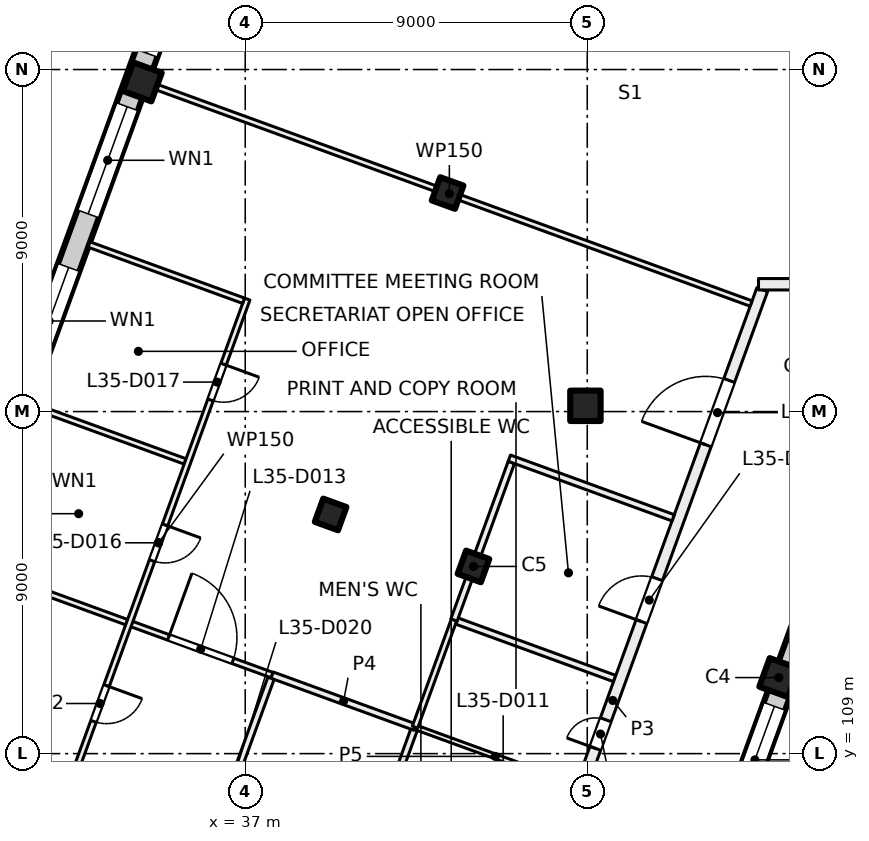
"""IFC4 building model, lengths in metres.
Left out: names, types, materials, properties, quantities, classifications, styles, units other than length and angle.
Written with IfcOpenShell. Run it as: python <this file> out.ifc"""

import sys

from ifc_helpers import new_model, si_unit, direction, frame, frame_2d, origin, origin_2d, place, context, subcontext, project, spatial, rectangle, extrude, element, fill, save


model = new_model("IFC4")
c1 = context("Model", 3, precision=1e-05, world=origin(), true_north=direction((0.0, 1.0)))
c2 = subcontext(c1, "Body", "Model", "MODEL_VIEW")
j1 = project(units=[si_unit("LENGTHUNIT", "METRE"), si_unit("PLANEANGLEUNIT", "RADIAN")], contexts=[c1])
p1 = place(None, origin())
s1 = spatial("IfcSite", under=j1, at=p1, CompositionType="ELEMENT")
p2 = place(p1, origin())
s2 = spatial("IfcBuilding", under=s1, at=p2, CompositionType="ELEMENT")
p3 = place(p2, frame((0.0, 0.0, 150.5)))
s3 = spatial("IfcBuildingStorey", under=s2, at=p3, CompositionType="ELEMENT", Elevation=150.5)
p4 = place(p3, frame((45.952, 118.152, 0.0), z_axis=(0.0, 0.0, 1.0), x_axis=(1.0, 0.0, 0.0)))
e1 = element("IfcColumn", 1, at=p4, inside=s3, PredefinedType="COLUMN", context=c2, shape_type="SweptSolid", body=[
    extrude(rectangle(XDim=0.8, YDim=0.8, at=origin_2d()), origin(), (0.0, 0.0, 1.0), 4.0),
])
for number, where, z_axis, x_axis in (
    (2, (43.006, 113.925, 0.0), (0.0, 0.0, 1.0), (-0.342, -0.94, 0.0)),
    (3, (42.325, 123.751, 0.0), (0.0, 0.0, 1.0), (-0.342, -0.94, 0.0)),
    (4, (39.247, 115.293, 0.0), (0.0, 0.0, 1.0), (-0.342, -0.94, 0.0)),
):
    element("IfcColumn", number, at=place(p3, frame(where, z_axis=z_axis, x_axis=x_axis)), inside=s3, PredefinedType="COLUMN", context=c2, shape_type="SweptSolid", body=[
        extrude(rectangle(XDim=0.65, YDim=0.65, at=origin_2d()), origin(), (0.0, 0.0, 1.0), 4.0),
    ])
for number, where, z_axis, x_axis in (
    (5, (51.04, 111.001, 0.0), (0.0, 0.0, 1.0), (-0.342, -0.94, 0.0)),
    (6, (34.291, 126.675, 0.0), (0.0, 0.0, 1.0), (-0.342, -0.94, 0.0)),
):
    element("IfcColumn", number, at=place(p3, frame(where, z_axis=z_axis, x_axis=x_axis)), inside=s3, PredefinedType="COLUMN", context=c2, shape_type="SweptSolid", body=[
        extrude(rectangle(XDim=0.8, YDim=0.8, at=origin_2d()), origin(), (0.0, 0.0, 1.0), 4.0),
    ])
p5 = place(p3, frame((52.212, 113.783, 0.0), z_axis=(0.0, 0.0, 1.0), x_axis=(-0.34202521188, -0.939690775968, 0.0)))
e7 = element("IfcWall", 7, at=p5, inside=s3, PredefinedType="SOLIDWALL", context=c2, shape_type="SweptSolid", body=[
    extrude(rectangle(XDim=21.745, YDim=0.6, at=frame_2d((10.873, 0.0))), origin(), (0.0, 0.0, 1.0), 3.625),
])
p6 = place(p5, frame((3.765, 0.0, 0.9)))
e8 = element("IfcOpeningElement", 8, at=p6, cuts=e7, PredefinedType="OPENING", context=c2, shape_type="SweptSolid", body=[
    extrude(rectangle(XDim=3.0, YDim=2.4, at=frame_2d((1.5, 1.2))), frame((0.0, 0.31, 0.0), z_axis=(0.0, -1.0, 0.0), x_axis=(1.0, 0.0, 0.0)), (0.0, 0.0, 1.0), 0.62),
])
p7 = place(p5, frame((8.265, 0.0, 0.9)))
e9 = element("IfcOpeningElement", 9, at=p7, cuts=e7, PredefinedType="OPENING", context=c2, shape_type="SweptSolid", body=[
    extrude(rectangle(XDim=3.0, YDim=2.4, at=frame_2d((1.5, 1.2))), frame((0.0, 0.31, 0.0), z_axis=(0.0, -1.0, 0.0), x_axis=(1.0, 0.0, 0.0)), (0.0, 0.0, 1.0), 0.62),
])
p8 = place(p5, frame((12.765, 0.0, 0.9)))
e10 = element("IfcOpeningElement", 10, at=p8, cuts=e7, PredefinedType="OPENING", context=c2, shape_type="SweptSolid", body=[
    extrude(rectangle(XDim=3.0, YDim=2.4, at=frame_2d((1.5, 1.2))), frame((0.0, 0.31, 0.0), z_axis=(0.0, -1.0, 0.0), x_axis=(1.0, 0.0, 0.0)), (0.0, 0.0, 1.0), 0.62),
])
p9 = place(p5, frame((17.265, 0.0, 0.9)))
e11 = element("IfcOpeningElement", 11, at=p9, cuts=e7, PredefinedType="OPENING", context=c2, shape_type="SweptSolid", body=[
    extrude(rectangle(XDim=3.0, YDim=2.4, at=frame_2d((1.5, 1.2))), frame((0.0, 0.31, 0.0), z_axis=(0.0, -1.0, 0.0), x_axis=(1.0, 0.0, 0.0)), (0.0, 0.0, 1.0), 0.62),
])
p10 = place(p3, frame((24.666, 100.669, 0.0), z_axis=(0.0, 0.0, 1.0), x_axis=(0.34201964167, 0.939692803373, 0.0)))
e12 = element("IfcWall", 12, at=p10, inside=s3, PredefinedType="SOLIDWALL", context=c2, shape_type="SweptSolid", body=[
    extrude(rectangle(XDim=32.884, YDim=0.6, at=frame_2d((16.442, 0.0))), origin(), (0.0, 0.0, 1.0), 3.625),
])
p11 = place(p10, frame((1.48, 0.0, 0.9)))
e13 = element("IfcOpeningElement", 13, at=p11, cuts=e12, PredefinedType="OPENING", context=c2, shape_type="SweptSolid", body=[
    extrude(rectangle(XDim=3.0, YDim=2.4, at=frame_2d((1.5, 1.2))), frame((0.0, 0.31, 0.0), z_axis=(0.0, -1.0, 0.0), x_axis=(1.0, 0.0, 0.0)), (0.0, 0.0, 1.0), 0.62),
])
p12 = place(p10, frame((5.98, 0.0, 0.9)))
e14 = element("IfcOpeningElement", 14, at=p12, cuts=e12, PredefinedType="OPENING", context=c2, shape_type="SweptSolid", body=[
    extrude(rectangle(XDim=3.0, YDim=2.4, at=frame_2d((1.5, 1.2))), frame((0.0, 0.31, 0.0), z_axis=(0.0, -1.0, 0.0), x_axis=(1.0, 0.0, 0.0)), (0.0, 0.0, 1.0), 0.62),
])
p13 = place(p10, frame((10.48, 0.0, 0.9)))
e15 = element("IfcOpeningElement", 15, at=p13, cuts=e12, PredefinedType="OPENING", context=c2, shape_type="SweptSolid", body=[
    extrude(rectangle(XDim=3.0, YDim=2.4, at=frame_2d((1.5, 1.2))), frame((0.0, 0.31, 0.0), z_axis=(0.0, -1.0, 0.0), x_axis=(1.0, 0.0, 0.0)), (0.0, 0.0, 1.0), 0.62),
])
p14 = place(p10, frame((14.98, 0.0, 0.9)))
e16 = element("IfcOpeningElement", 16, at=p14, cuts=e12, PredefinedType="OPENING", context=c2, shape_type="SweptSolid", body=[
    extrude(rectangle(XDim=3.0, YDim=2.4, at=frame_2d((1.5, 1.2))), frame((0.0, 0.31, 0.0), z_axis=(0.0, -1.0, 0.0), x_axis=(1.0, 0.0, 0.0)), (0.0, 0.0, 1.0), 0.62),
])
p15 = place(p10, frame((19.48, 0.0, 0.9)))
e17 = element("IfcOpeningElement", 17, at=p15, cuts=e12, PredefinedType="OPENING", context=c2, shape_type="SweptSolid", body=[
    extrude(rectangle(XDim=3.0, YDim=2.4, at=frame_2d((1.5, 1.2))), frame((0.0, 0.31, 0.0), z_axis=(0.0, -1.0, 0.0), x_axis=(1.0, 0.0, 0.0)), (0.0, 0.0, 1.0), 0.62),
])
p16 = place(p10, frame((23.98, 0.0, 0.9)))
e18 = element("IfcOpeningElement", 18, at=p16, cuts=e12, PredefinedType="OPENING", context=c2, shape_type="SweptSolid", body=[
    extrude(rectangle(XDim=3.0, YDim=2.4, at=frame_2d((1.5, 1.2))), frame((0.0, 0.31, 0.0), z_axis=(0.0, -1.0, 0.0), x_axis=(1.0, 0.0, 0.0)), (0.0, 0.0, 1.0), 0.62),
])
p17 = place(p10, frame((28.48, 0.0, 0.9)))
e19 = element("IfcOpeningElement", 19, at=p17, cuts=e12, PredefinedType="OPENING", context=c2, shape_type="SweptSolid", body=[
    extrude(rectangle(XDim=3.0, YDim=2.4, at=frame_2d((1.5, 1.2))), frame((0.0, 0.31, 0.0), z_axis=(0.0, -1.0, 0.0), x_axis=(1.0, 0.0, 0.0)), (0.0, 0.0, 1.0), 0.62),
])
p18 = place(p3, frame((29.814, 113.938, 0.0), z_axis=(0.0, 0.0, 1.0), x_axis=(0.939698351515, -0.342004397867, 0.0)))
e20 = element("IfcWall", 20, at=p18, inside=s3, PredefinedType="PARTITIONING", context=c2, shape_type="SweptSolid", body=[
    extrude(rectangle(XDim=8.401, YDim=0.15, at=frame_2d((4.2, 0.0))), origin(), (0.0, 0.0, 1.0), 3.625),
])
p19 = place(p18, frame((5.5, 0.0, 0.0)))
e21 = element("IfcOpeningElement", 21, at=p19, cuts=e20, PredefinedType="OPENING", context=c2, shape_type="SweptSolid", body=[
    extrude(rectangle(XDim=1.8, YDim=2.1, at=frame_2d((0.9, 1.05))), frame((0.0, 0.085, 0.0), z_axis=(0.0, -1.0, 0.0), x_axis=(1.0, 0.0, 0.0)), (0.0, 0.0, 1.0), 0.17),
])
p20 = place(p3, frame((31.353, 118.166, 0.0), z_axis=(0.0, 0.0, 1.0), x_axis=(0.939803311208, -0.341715870634, 0.0)))
e22 = element("IfcWall", 22, at=p20, inside=s3, PredefinedType="PARTITIONING", context=c2, shape_type="SweptSolid", body=[
    extrude(rectangle(XDim=4.325, YDim=0.15, at=frame_2d((2.163, 0.0))), origin(), (0.0, 0.0, 1.0), 3.625),
])
p21 = place(p3, frame((32.34, 108.23, 0.0), z_axis=(0.0, 0.0, 1.0), x_axis=(-0.939737385516, 0.341897128188, 0.0)))
e23 = element("IfcWall", 23, at=p21, inside=s3, PredefinedType="PARTITIONING", context=c2, shape_type="SweptSolid", body=[
    extrude(rectangle(XDim=4.326, YDim=0.15, at=frame_2d((2.163, 0.0))), origin(), (0.0, 0.0, 1.0), 3.625),
])
p22 = place(p3, frame((37.053, 120.96, 0.0), z_axis=(0.0, 0.0, 1.0), x_axis=(-0.342064742067, -0.939676386973, 0.0)))
e24 = element("IfcWall", 24, at=p22, inside=s3, PredefinedType="PARTITIONING", context=c2, shape_type="SweptSolid", body=[
    extrude(rectangle(XDim=13.649, YDim=0.15, at=frame_2d((6.825, 0.0))), origin(), (0.0, 0.0, 1.0), 3.625),
])
p23 = place(p22, frame((10.824, 0.0, 0.0)))
e25 = element("IfcOpeningElement", 25, at=p23, cuts=e24, PredefinedType="OPENING", context=c2, shape_type="SweptSolid", body=[
    extrude(rectangle(XDim=1.0, YDim=2.1, at=frame_2d((0.5, 1.05))), frame((0.0, 0.085, 0.0), z_axis=(0.0, -1.0, 0.0), x_axis=(1.0, 0.0, 0.0)), (0.0, 0.0, 1.0), 0.17),
])
p24 = place(p22, frame((6.324, 0.0, 0.0)))
e26 = element("IfcOpeningElement", 26, at=p24, cuts=e24, PredefinedType="OPENING", context=c2, shape_type="SweptSolid", body=[
    extrude(rectangle(XDim=1.0, YDim=2.1, at=frame_2d((0.5, 1.05))), frame((0.0, 0.085, 0.0), z_axis=(0.0, -1.0, 0.0), x_axis=(1.0, 0.0, 0.0)), (0.0, 0.0, 1.0), 0.17),
])
p25 = place(p22, frame((1.824, 0.0, 0.0)))
e27 = element("IfcOpeningElement", 27, at=p25, cuts=e24, PredefinedType="OPENING", context=c2, shape_type="SweptSolid", body=[
    extrude(rectangle(XDim=1.0, YDim=2.1, at=frame_2d((0.5, 1.05))), frame((0.0, 0.085, 0.0), z_axis=(0.0, -1.0, 0.0), x_axis=(1.0, 0.0, 0.0)), (0.0, 0.0, 1.0), 0.17),
])
p26 = place(p3, frame((32.892, 122.395, 0.0), z_axis=(0.0, 0.0, 1.0), x_axis=(0.93973078783, -0.341915262023, 0.0)))
e28 = element("IfcWall", 28, at=p26, inside=s3, PredefinedType="PARTITIONING", context=c2, shape_type="SweptSolid", body=[
    extrude(rectangle(XDim=4.326, YDim=0.15, at=frame_2d((2.163, 0.0))), origin(), (0.0, 0.0, 1.0), 3.625),
])
p27 = place(p3, frame((34.66, 102.689, 0.0), z_axis=(0.0, 0.0, 1.0), x_axis=(0.341951828534, 0.939717482524, 0.0)))
e29 = element("IfcWall", 29, at=p27, inside=s3, PredefinedType="PARTITIONING", context=c2, shape_type="SweptSolid", body=[
    extrude(rectangle(XDim=8.826, YDim=0.175, at=frame_2d((4.413, 0.0))), origin(), (0.0, 0.0, 1.0), 3.625),
])
p28 = place(p27, frame((4.813, 0.0, 0.0)))
e30 = element("IfcOpeningElement", 30, at=p28, cuts=e29, PredefinedType="OPENING", context=c2, shape_type="SweptSolid", body=[
    extrude(rectangle(XDim=1.2, YDim=2.1, at=frame_2d((0.6, 1.05))), frame((0.0, 0.097, 0.0), z_axis=(0.0, -1.0, 0.0), x_axis=(1.0, 0.0, 0.0)), (0.0, 0.0, 1.0), 0.195),
])
p29 = place(p3, frame((38.418, 101.322, 0.0), z_axis=(0.0, 0.0, 1.0), x_axis=(0.342101536507, 0.939662992099, 0.0)))
e31 = element("IfcWall", 31, at=p29, inside=s3, PredefinedType="PARTITIONING", context=c2, shape_type="SweptSolid", body=[
    extrude(rectangle(XDim=8.913, YDim=0.175, at=frame_2d((4.457, 0.0))), origin(), (0.0, 0.0, 1.0), 3.625),
])
p30 = place(p3, frame((41.467, 109.697, 0.0), z_axis=(0.0, 0.0, 1.0), x_axis=(-0.939713209288, 0.341963571582, 0.0)))
e32 = element("IfcWall", 32, at=p30, inside=s3, PredefinedType="PARTITIONING", context=c2, shape_type="SweptSolid", body=[
    extrude(rectangle(XDim=4.0, YDim=0.175, at=frame_2d((2.0, 0.0))), origin(), (0.0, 0.0, 1.0), 3.625),
])
p31 = place(p3, frame((41.467, 109.697, 0.0), z_axis=(0.0, 0.0, 1.0), x_axis=(0.939609529273, -0.342248349154, 0.0)))
e33 = element("IfcWall", 33, at=p31, inside=s3, PredefinedType="PARTITIONING", context=c2, shape_type="SweptSolid", body=[
    extrude(rectangle(XDim=4.5, YDim=0.125, at=frame_2d((2.25, 0.0))), origin(), (0.0, 0.0, 1.0), 3.625),
])
p32 = place(p3, frame((42.493, 112.516, 0.0), z_axis=(0.0, 0.0, 1.0), x_axis=(-0.341965219194, -0.939712609717, 0.0)))
e34 = element("IfcWall", 34, at=p32, inside=s3, PredefinedType="PARTITIONING", context=c2, shape_type="SweptSolid", body=[
    extrude(rectangle(XDim=3.0, YDim=0.15, at=frame_2d((1.5, 0.0))), origin(), (0.0, 0.0, 1.0), 3.625),
])
p33 = place(p3, frame((42.575, 112.486, 0.0), z_axis=(0.0, 0.0, 1.0), x_axis=(0.939620446327, -0.342218375959, 0.0)))
e35 = element("IfcWall", 35, at=p33, inside=s3, PredefinedType="PARTITIONING", context=c2, shape_type="SweptSolid", body=[
    extrude(rectangle(XDim=4.412, YDim=0.175, at=frame_2d((2.206, 0.0))), origin(), (0.0, 0.0, 1.0), 3.625),
])
p34 = place(p3, frame((42.737, 99.59, 0.0), z_axis=(0.0, 0.0, 1.0), x_axis=(0.341992703977, 0.939702607438, 0.0)))
e36 = element("IfcWall", 36, at=p34, inside=s3, PredefinedType="PARTITIONING", context=c2, shape_type="SweptSolid", body=[
    extrude(rectangle(XDim=23.006, YDim=0.3, at=frame_2d((11.503, 0.0))), origin(), (0.0, 0.0, 1.0), 3.625),
])
p35 = place(p34, frame((4.062, 0.0, 0.0)))
e37 = element("IfcOpeningElement", 37, at=p35, cuts=e36, PredefinedType="OPENING", context=c2, shape_type="SweptSolid", body=[
    extrude(rectangle(XDim=1.0, YDim=2.1, at=frame_2d((0.5, 1.05))), frame((0.0, 0.16, 0.0), z_axis=(0.0, -1.0, 0.0), x_axis=(1.0, 0.0, 0.0)), (0.0, 0.0, 1.0), 0.32),
])
p36 = place(p34, frame((10.162, 0.0, 0.0)))
e38 = element("IfcOpeningElement", 38, at=p36, cuts=e36, PredefinedType="OPENING", context=c2, shape_type="SweptSolid", body=[
    extrude(rectangle(XDim=0.8, YDim=2.1, at=frame_2d((0.4, 1.05))), frame((0.0, 0.16, 0.0), z_axis=(0.0, -1.0, 0.0), x_axis=(1.0, 0.0, 0.0)), (0.0, 0.0, 1.0), 0.32),
])
p37 = place(p34, frame((13.712, 0.0, 0.0)))
e39 = element("IfcOpeningElement", 39, at=p37, cuts=e36, PredefinedType="OPENING", context=c2, shape_type="SweptSolid", body=[
    extrude(rectangle(XDim=1.2, YDim=2.1, at=frame_2d((0.6, 1.05))), frame((0.0, 0.16, 0.0), z_axis=(0.0, -1.0, 0.0), x_axis=(1.0, 0.0, 0.0)), (0.0, 0.0, 1.0), 0.32),
])
p38 = place(p34, frame((18.662, 0.0, 0.0)))
e40 = element("IfcOpeningElement", 40, at=p38, cuts=e36, PredefinedType="OPENING", context=c2, shape_type="SweptSolid", body=[
    extrude(rectangle(XDim=1.8, YDim=2.1, at=frame_2d((0.9, 1.05))), frame((0.0, 0.16, 0.0), z_axis=(0.0, -1.0, 0.0), x_axis=(1.0, 0.0, 0.0)), (0.0, 0.0, 1.0), 0.32),
])
p39 = place(p3, frame((44.002, 116.662, 0.0), z_axis=(0.0, 0.0, 1.0), x_axis=(-0.342022951975, -0.939691598517, 0.0)))
e41 = element("IfcWall", 41, at=p39, inside=s3, PredefinedType="PARTITIONING", context=c2, shape_type="SweptSolid", body=[
    extrude(rectangle(XDim=4.412, YDim=0.175, at=frame_2d((2.206, 0.0))), origin(), (0.0, 0.0, 1.0), 3.625),
])
p40 = place(p3, frame((48.26, 115.205, 0.0), z_axis=(0.0, 0.0, 1.0), x_axis=(-0.939684589011, 0.34204220964, 0.0)))
e42 = element("IfcWall", 42, at=p40, inside=s3, PredefinedType="PARTITIONING", context=c2, shape_type="SweptSolid", body=[
    extrude(rectangle(XDim=4.587, YDim=0.175, at=frame_2d((2.293, 0.0))), origin(), (0.0, 0.0, 1.0), 3.625),
])
p41 = place(p3, frame((50.311, 120.843, 0.0), z_axis=(0.0, 0.0, 1.0), x_axis=(-0.939664702396, 0.342096838733, 0.0)))
e43 = element("IfcWall", 43, at=p41, inside=s3, PredefinedType="PARTITIONING", context=c2, shape_type="SweptSolid", body=[
    extrude(rectangle(XDim=16.899, YDim=0.15, at=frame_2d((8.449, 0.0))), origin(), (0.0, 0.0, 1.0), 3.625),
])
p42 = place(p3, frame((50.506, 121.35, 0.0), z_axis=(0.0, 0.0, 1.0), x_axis=(1.0, 0.0, 0.0)))
e44 = element("IfcWall", 44, at=p42, inside=s3, PredefinedType="PARTITIONING", context=c2, shape_type="SweptSolid", body=[
    extrude(rectangle(XDim=35.319, YDim=0.3, at=frame_2d((17.659, 0.0))), origin(), (0.0, 0.0, 1.0), 3.625),
])
p43 = place(p42, frame((13.844, 0.0, 0.0)))
e45 = element("IfcOpeningElement", 45, at=p43, cuts=e44, PredefinedType="OPENING", context=c2, shape_type="SweptSolid", body=[
    extrude(rectangle(XDim=0.8, YDim=2.1, at=frame_2d((0.4, 1.05))), frame((0.0, 0.16, 0.0), z_axis=(0.0, -1.0, 0.0), x_axis=(1.0, 0.0, 0.0)), (0.0, 0.0, 1.0), 0.32),
])
p44 = place(p42, frame((9.144, 0.0, 0.0)))
e46 = element("IfcOpeningElement", 46, at=p44, cuts=e44, PredefinedType="OPENING", context=c2, shape_type="SweptSolid", body=[
    extrude(rectangle(XDim=1.2, YDim=2.1, at=frame_2d((0.6, 1.05))), frame((0.0, 0.16, 0.0), z_axis=(0.0, -1.0, 0.0), x_axis=(1.0, 0.0, 0.0)), (0.0, 0.0, 1.0), 0.32),
])
p45 = place(p42, frame((24.594, 0.0, 0.0)))
e47 = element("IfcOpeningElement", 47, at=p45, cuts=e44, PredefinedType="OPENING", context=c2, shape_type="SweptSolid", body=[
    extrude(rectangle(XDim=1.8, YDim=2.1, at=frame_2d((0.9, 1.05))), frame((0.0, 0.16, 0.0), z_axis=(0.0, -1.0, 0.0), x_axis=(1.0, 0.0, 0.0)), (0.0, 0.0, 1.0), 0.32),
])
p46 = place(p42, frame((2.543, 0.0, 0.0)))
e48 = element("IfcOpeningElement", 48, at=p46, cuts=e44, PredefinedType="OPENING", context=c2, shape_type="SweptSolid", body=[
    extrude(rectangle(XDim=1.8, YDim=2.1, at=frame_2d((0.9, 1.05))), frame((0.0, 0.16, 0.0), z_axis=(0.0, -1.0, 0.0), x_axis=(1.0, 0.0, 0.0)), (0.0, 0.0, 1.0), 0.32),
])
p47 = place(p6, origin())
e49 = element("IfcWindow", 49, at=p47, inside=s3, PartitioningType="SINGLE_PANEL", PredefinedType="WINDOW", context=c2, shape_type="SweptSolid", body=[
    extrude(rectangle(XDim=3.0, YDim=2.4, at=frame_2d((1.5, 1.2))), frame((0.0, 0.03, 0.0), z_axis=(0.0, -1.0, 0.0), x_axis=(1.0, 0.0, 0.0)), (0.0, 0.0, 1.0), 0.06),
])
fill(e8, e49)
p48 = place(p15, origin())
e50 = element("IfcWindow", 50, at=p48, inside=s3, PartitioningType="SINGLE_PANEL", PredefinedType="WINDOW", context=c2, shape_type="SweptSolid", body=[
    extrude(rectangle(XDim=3.0, YDim=2.4, at=frame_2d((1.5, 1.2))), frame((0.0, 0.03, 0.0), z_axis=(0.0, -1.0, 0.0), x_axis=(1.0, 0.0, 0.0)), (0.0, 0.0, 1.0), 0.06),
])
fill(e17, e50)
p49 = place(p16, origin())
e51 = element("IfcWindow", 51, at=p49, inside=s3, PartitioningType="SINGLE_PANEL", PredefinedType="WINDOW", context=c2, shape_type="SweptSolid", body=[
    extrude(rectangle(XDim=3.0, YDim=2.4, at=frame_2d((1.5, 1.2))), frame((0.0, 0.03, 0.0), z_axis=(0.0, -1.0, 0.0), x_axis=(1.0, 0.0, 0.0)), (0.0, 0.0, 1.0), 0.06),
])
fill(e18, e51)
p50 = place(p17, origin())
e52 = element("IfcWindow", 52, at=p50, inside=s3, PartitioningType="SINGLE_PANEL", PredefinedType="WINDOW", context=c2, shape_type="SweptSolid", body=[
    extrude(rectangle(XDim=3.0, YDim=2.4, at=frame_2d((1.5, 1.2))), frame((0.0, 0.03, 0.0), z_axis=(0.0, -1.0, 0.0), x_axis=(1.0, 0.0, 0.0)), (0.0, 0.0, 1.0), 0.06),
])
fill(e19, e52)
p51 = place(p23, origin())
e53 = element("IfcDoor", 53, at=p51, inside=s3, OperationType="SINGLE_SWING_LEFT", PredefinedType="DOOR", context=c2, shape_type="SweptSolid", body=[
    extrude(rectangle(XDim=1.0, YDim=2.1, at=frame_2d((0.5, 1.05))), frame((0.0, 0.025, 0.0), z_axis=(0.0, -1.0, 0.0), x_axis=(1.0, 0.0, 0.0)), (0.0, 0.0, 1.0), 0.05),
])
fill(e25, e53)
p52 = place(p19, origin())
e54 = element("IfcDoor", 54, at=p52, inside=s3, OperationType="DOUBLE_DOOR_SINGLE_SWING", PredefinedType="DOOR", context=c2, shape_type="SweptSolid", body=[
    extrude(rectangle(XDim=1.8, YDim=2.1, at=frame_2d((0.9, 1.05))), frame((0.0, 0.025, 0.0), z_axis=(0.0, -1.0, 0.0), x_axis=(1.0, 0.0, 0.0)), (0.0, 0.0, 1.0), 0.05),
])
fill(e21, e54)
p53 = place(p36, origin())
e55 = element("IfcDoor", 55, at=p53, inside=s3, OperationType="SINGLE_SWING_RIGHT", PredefinedType="DOOR", context=c2, shape_type="SweptSolid", body=[
    extrude(rectangle(XDim=0.8, YDim=2.1, at=frame_2d((0.4, 1.05))), frame((0.0, 0.025, 0.0), z_axis=(0.0, -1.0, 0.0), x_axis=(1.0, 0.0, 0.0)), (0.0, 0.0, 1.0), 0.05),
])
fill(e38, e55)
p54 = place(p37, origin())
e56 = element("IfcDoor", 56, at=p54, inside=s3, OperationType="DOUBLE_DOOR_SINGLE_SWING", PredefinedType="DOOR", context=c2, shape_type="SweptSolid", body=[
    extrude(rectangle(XDim=1.2, YDim=2.1, at=frame_2d((0.6, 1.05))), frame((0.0, 0.025, 0.0), z_axis=(0.0, -1.0, 0.0), x_axis=(1.0, 0.0, 0.0)), (0.0, 0.0, 1.0), 0.05),
])
fill(e39, e56)
p55 = place(p24, origin())
e57 = element("IfcDoor", 57, at=p55, inside=s3, OperationType="SINGLE_SWING_RIGHT", PredefinedType="DOOR", context=c2, shape_type="SweptSolid", body=[
    extrude(rectangle(XDim=1.0, YDim=2.1, at=frame_2d((0.5, 1.05))), frame((0.0, 0.025, 0.0), z_axis=(0.0, -1.0, 0.0), x_axis=(1.0, 0.0, 0.0)), (0.0, 0.0, 1.0), 0.05),
])
fill(e26, e57)
p56 = place(p25, origin())
e58 = element("IfcDoor", 58, at=p56, inside=s3, OperationType="SINGLE_SWING_LEFT", PredefinedType="DOOR", context=c2, shape_type="SweptSolid", body=[
    extrude(rectangle(XDim=1.0, YDim=2.1, at=frame_2d((0.5, 1.05))), frame((0.0, 0.025, 0.0), z_axis=(0.0, -1.0, 0.0), x_axis=(1.0, 0.0, 0.0)), (0.0, 0.0, 1.0), 0.05),
])
fill(e27, e58)
p57 = place(p38, origin())
e59 = element("IfcDoor", 59, at=p57, inside=s3, OperationType="DOUBLE_DOOR_SINGLE_SWING", PredefinedType="DOOR", context=c2, shape_type="SweptSolid", body=[
    extrude(rectangle(XDim=1.8, YDim=2.1, at=frame_2d((0.9, 1.05))), frame((0.0, 0.025, 0.0), z_axis=(0.0, -1.0, 0.0), x_axis=(1.0, 0.0, 0.0)), (0.0, 0.0, 1.0), 0.05),
])
fill(e40, e59)
save(model, sys.argv[1])
